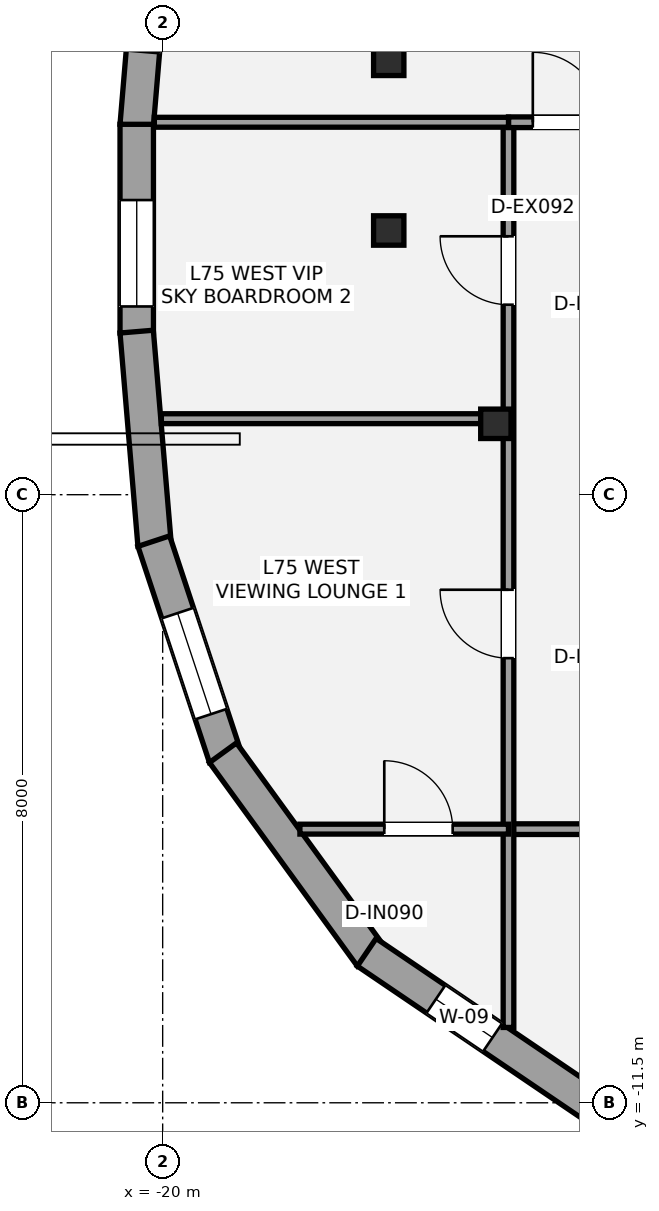
"""IFC4 building model, lengths in metres.
Left out: names, types, materials, properties, quantities, classifications, styles, units other than length and angle.
Written with IfcOpenShell. Run it as: python <this file> out.ifc"""

import sys

from ifc_helpers import new_model, si_unit, direction, frame, frame_2d, origin, origin_2d, place, context, subcontext, project, spatial, rectangle, i_section, extrude, element, fill, save


model = new_model("IFC4")
c1 = context("Model", 3, precision=1e-05, world=origin(), true_north=direction((0.0, 1.0)))
c2 = subcontext(c1, "Body", "Model", "MODEL_VIEW")
j1 = project(units=[si_unit("LENGTHUNIT", "METRE"), si_unit("PLANEANGLEUNIT", "RADIAN")], contexts=[c1])
p1 = place(None, origin())
s1 = spatial("IfcSite", under=j1, at=p1, CompositionType="ELEMENT")
p2 = place(p1, origin())
s2 = spatial("IfcBuilding", under=s1, at=p2, CompositionType="ELEMENT")
p3 = place(p2, frame((0.0, 0.0, 264.8)))
s3 = spatial("IfcBuildingStorey", under=s2, at=p3, CompositionType="ELEMENT", Elevation=264.8)
for number, where, z_axis, x_axis in (
    (1, (-17.026, 2.208, 0.0), (0.0, 0.0, 1.0), (1.0, 0.0, 0.0)),
    (2, (-17.026, -0.024, 0.0), (0.0, 0.0, 1.0), (1.0, 0.0, 0.0)),
    (3, (-15.616, -2.567, 0.0), (0.0, 0.0, 1.0), (1.0, 0.0, 0.0)),
):
    element("IfcColumn", number, at=place(p3, frame(where, z_axis=z_axis, x_axis=x_axis)), inside=s3, PredefinedType="COLUMN", context=c2, shape_type="SweptSolid", body=[
        extrude(i_section(OverallWidth=0.399, OverallDepth=0.387, WebThickness=0.021, FlangeThickness=0.033, at=origin_2d()), origin(), (0.0, 0.0, 1.0), 4.4),
    ])
p4 = place(p3, frame((-20.342, 1.354, 0.0), z_axis=(0.0, 0.0, 1.0), x_axis=(0.083719665048, 0.996489346498, 0.0)))
e4 = element("IfcWall", 4, at=p4, inside=s3, PredefinedType="STANDARD", context=c2, shape_type="SweptSolid", body=[
    extrude(rectangle(XDim=2.817, YDim=0.44, at=frame_2d((1.409, 0.0))), origin(), (0.0, 0.0, 1.0), 3.566),
])
p5 = place(p4, frame((0.975, 0.0, 0.58)))
e5 = element("IfcOpeningElement", 5, at=p5, cuts=e4, PredefinedType="OPENING", context=c2, shape_type="SweptSolid", body=[
    extrude(rectangle(XDim=1.4, YDim=1.55, at=frame_2d((0.7, 0.775))), frame((0.0, 0.23, 0.0), z_axis=(0.0, -1.0, 0.0), x_axis=(1.0, 0.0, 0.0)), (0.0, 0.0, 1.0), 0.46),
])
p6 = place(p3, frame((-20.341, -1.373, 0.0), z_axis=(0.0, 0.0, 1.0), x_axis=(0.0, 1.0, 0.0)))
e6 = element("IfcWall", 6, at=p6, inside=s3, PredefinedType="STANDARD", context=c2, shape_type="SweptSolid", body=[
    extrude(rectangle(XDim=2.746, YDim=0.44, at=frame_2d((1.373, 0.0))), origin(), (0.0, 0.0, 1.0), 3.566),
])
p7 = place(p6, frame((0.349, 0.0, 0.6)))
e7 = element("IfcOpeningElement", 7, at=p7, cuts=e6, PredefinedType="OPENING", context=c2, shape_type="SweptSolid", body=[
    extrude(rectangle(XDim=1.4, YDim=1.55, at=frame_2d((0.7, 0.775))), frame((0.0, 0.23, 0.0), z_axis=(0.0, -1.0, 0.0), x_axis=(1.0, 0.0, 0.0)), (0.0, 0.0, 1.0), 0.46),
])
p8 = place(p3, frame((-20.106, -4.162, 0.0), z_axis=(0.0, 0.0, 1.0), x_axis=(-0.083719665048, 0.996489346498, 0.0)))
e8 = element("IfcWall", 8, at=p8, inside=s3, PredefinedType="STANDARD", context=c2, shape_type="SweptSolid", body=[
    extrude(rectangle(XDim=2.817, YDim=0.44, at=frame_2d((1.409, 0.0))), origin(), (0.0, 0.0, 1.0), 3.566),
])
p9 = place(p3, frame((-19.176, -6.955, 0.0), z_axis=(0.0, 0.0, 1.0), x_axis=(-0.314148979119, 0.949373698245, 0.0)))
e9 = element("IfcWall", 9, at=p9, inside=s3, PredefinedType="STANDARD", context=c2, shape_type="SweptSolid", body=[
    extrude(rectangle(XDim=2.996, YDim=0.44, at=frame_2d((1.498, 0.0))), origin(), (0.0, 0.0, 1.0), 3.566),
])
p10 = place(p9, frame((0.599, 0.0, 0.58)))
e10 = element("IfcOpeningElement", 10, at=p10, cuts=e9, PredefinedType="OPENING", context=c2, shape_type="SweptSolid", body=[
    extrude(rectangle(XDim=1.4, YDim=1.55, at=frame_2d((0.7, 0.775))), frame((0.0, 0.23, 0.0), z_axis=(0.0, -1.0, 0.0), x_axis=(1.0, 0.0, 0.0)), (0.0, 0.0, 1.0), 0.46),
])
p11 = place(p3, frame((-17.26, -9.573, 0.0), z_axis=(0.0, 0.0, 1.0), x_axis=(-0.5878953838, 0.808936967697, 0.0)))
e11 = element("IfcWall", 11, at=p11, inside=s3, PredefinedType="STANDARD", context=c2, shape_type="SweptSolid", body=[
    extrude(rectangle(XDim=3.31, YDim=0.44, at=frame_2d((1.655, 0.0))), origin(), (0.0, 0.0, 1.0), 3.566),
])
p12 = place(p3, frame((-14.13, -11.679, 0.0), z_axis=(0.0, 0.0, 1.0), x_axis=(-0.827730474906, 0.561125886867, 0.0)))
e12 = element("IfcWall", 12, at=p12, inside=s3, PredefinedType="STANDARD", context=c2, shape_type="SweptSolid", body=[
    extrude(rectangle(XDim=3.848, YDim=0.44, at=frame_2d((1.924, 0.0))), origin(), (0.0, 0.0, 1.0), 3.566),
])
p13 = place(p12, frame((1.849, 0.0, 0.58)))
e13 = element("IfcOpeningElement", 13, at=p13, cuts=e12, PredefinedType="OPENING", context=c2, shape_type="SweptSolid", body=[
    extrude(rectangle(XDim=0.9, YDim=1.35, at=frame_2d((0.45, 0.675))), frame((0.0, 0.23, 0.0), z_axis=(0.0, -1.0, 0.0), x_axis=(1.0, 0.0, 0.0)), (0.0, 0.0, 1.0), 0.46),
])
p14 = place(p3, frame((-15.45, -7.9, 0.0), z_axis=(0.0, 0.0, 1.0), x_axis=(1.0, 0.0, 0.0)))
e14 = element("IfcWall", 14, at=p14, inside=s3, PredefinedType="PARTITIONING", context=c2, shape_type="SweptSolid", body=[
    extrude(rectangle(XDim=30.9, YDim=0.14, at=frame_2d((15.45, 0.0))), origin(), (0.0, 0.0, 1.0), 3.661),
])
p15 = place(p14, frame((5.275, 0.0, 0.0)))
e15 = element("IfcOpeningElement", 15, at=p15, cuts=e14, PredefinedType="OPENING", context=c2, shape_type="SweptSolid", body=[
    extrude(rectangle(XDim=0.9, YDim=2.1, at=frame_2d((0.45, 1.05))), frame((0.0, 0.08, 0.0), z_axis=(0.0, -1.0, 0.0), x_axis=(1.0, 0.0, 0.0)), (0.0, 0.0, 1.0), 0.16),
])
p16 = place(p14, frame((15.6, 0.0, 0.0)))
e16 = element("IfcOpeningElement", 16, at=p16, cuts=e14, PredefinedType="OPENING", context=c2, shape_type="SweptSolid", body=[
    extrude(rectangle(XDim=0.9, YDim=2.1, at=frame_2d((0.45, 1.05))), frame((0.0, 0.08, 0.0), z_axis=(0.0, -1.0, 0.0), x_axis=(1.0, 0.0, 0.0)), (0.0, 0.0, 1.0), 0.16),
])
p17 = place(p14, frame((25.025, 0.0, 0.0)))
e17 = element("IfcOpeningElement", 17, at=p17, cuts=e14, PredefinedType="OPENING", context=c2, shape_type="SweptSolid", body=[
    extrude(rectangle(XDim=1.5, YDim=2.15, at=frame_2d((0.75, 1.075))), frame((0.0, 0.08, 0.0), z_axis=(0.0, -1.0, 0.0), x_axis=(1.0, 0.0, 0.0)), (0.0, 0.0, 1.0), 0.16),
])
p18 = place(p3, frame((-15.45, -10.509, 0.0), z_axis=(0.0, 0.0, 1.0), x_axis=(0.0, 1.0, 0.0)))
e18 = element("IfcWall", 18, at=p18, inside=s3, PredefinedType="PARTITIONING", context=c2, shape_type="SweptSolid", body=[
    extrude(rectangle(XDim=11.909, YDim=0.14, at=frame_2d((5.955, 0.0))), origin(), (0.0, 0.0, 1.0), 3.661),
])
p19 = place(p18, frame((4.859, 0.0, 0.0)))
e19 = element("IfcOpeningElement", 19, at=p19, cuts=e18, PredefinedType="OPENING", context=c2, shape_type="SweptSolid", body=[
    extrude(rectangle(XDim=0.9, YDim=2.1, at=frame_2d((0.45, 1.05))), frame((0.0, 0.08, 0.0), z_axis=(0.0, -1.0, 0.0), x_axis=(1.0, 0.0, 0.0)), (0.0, 0.0, 1.0), 0.16),
])
p20 = place(p18, frame((9.509, 0.0, 0.0)))
e20 = element("IfcOpeningElement", 20, at=p20, cuts=e18, PredefinedType="OPENING", context=c2, shape_type="SweptSolid", body=[
    extrude(rectangle(XDim=0.9, YDim=2.1, at=frame_2d((0.45, 1.05))), frame((0.0, 0.08, 0.0), z_axis=(0.0, -1.0, 0.0), x_axis=(1.0, 0.0, 0.0)), (0.0, 0.0, 1.0), 0.16),
])
p21 = place(p3, frame((-15.45, 1.4, 0.0), z_axis=(0.0, 0.0, 1.0), x_axis=(1.0, 0.0, 0.0)))
e21 = element("IfcWall", 21, at=p21, inside=s3, PredefinedType="PARTITIONING", context=c2, shape_type="SweptSolid", body=[
    extrude(rectangle(XDim=1.75, YDim=0.14, at=frame_2d((0.875, 0.0))), origin(), (0.0, 0.0, 1.0), 3.661),
])
p22 = place(p21, frame((0.32, 0.0, 0.0)))
e22 = element("IfcOpeningElement", 22, at=p22, cuts=e21, PredefinedType="OPENING", context=c2, shape_type="SweptSolid", body=[
    extrude(rectangle(XDim=0.92, YDim=2.15, at=frame_2d((0.46, 1.075))), frame((0.0, 0.08, 0.0), z_axis=(0.0, -1.0, 0.0), x_axis=(1.0, 0.0, 0.0)), (0.0, 0.0, 1.0), 0.16),
])
p23 = place(p3, frame((-20.109, 1.4, 0.0), z_axis=(0.0, 0.0, 1.0), x_axis=(1.0, 0.0, 0.0)))
e23 = element("IfcWall", 23, at=p23, inside=s3, PredefinedType="PARTITIONING", context=c2, shape_type="SweptSolid", body=[
    extrude(rectangle(XDim=4.659, YDim=0.13, at=frame_2d((2.33, 0.0))), origin(), (0.0, 0.0, 1.0), 3.661),
])
p24 = place(p3, frame((-18.194, -7.9, 0.0), z_axis=(0.0, 0.0, 1.0), x_axis=(1.0, 0.0, 0.0)))
e24 = element("IfcWall", 24, at=p24, inside=s3, PredefinedType="PARTITIONING", context=c2, shape_type="SweptSolid", body=[
    extrude(rectangle(XDim=2.744, YDim=0.13, at=frame_2d((1.372, 0.0))), origin(), (0.0, 0.0, 1.0), 4.2),
])
p25 = place(p24, frame((1.11, 0.0, 0.0)))
e25 = element("IfcOpeningElement", 25, at=p25, cuts=e24, PredefinedType="OPENING", context=c2, shape_type="SweptSolid", body=[
    extrude(rectangle(XDim=0.9, YDim=2.1, at=frame_2d((0.45, 1.05))), frame((0.0, 0.075, 0.0), z_axis=(0.0, -1.0, 0.0), x_axis=(1.0, 0.0, 0.0)), (0.0, 0.0, 1.0), 0.15),
])
p26 = place(p3, frame((-20.017, -2.5, 0.0), z_axis=(0.0, 0.0, 1.0), x_axis=(1.0, 0.0, 0.0)))
e26 = element("IfcWall", 26, at=p26, inside=s3, PredefinedType="PARTITIONING", context=c2, shape_type="SweptSolid", body=[
    extrude(rectangle(XDim=4.567, YDim=0.13, at=frame_2d((2.284, 0.0))), origin(), (0.0, 0.0, 1.0), 3.587),
])
p27 = place(p5, origin())
e27 = element("IfcWindow", 27, at=p27, inside=s3, PartitioningType="SINGLE_PANEL", PredefinedType="WINDOW", context=c2, shape_type="SweptSolid", body=[
    extrude(rectangle(XDim=1.4, YDim=1.55, at=frame_2d((0.7, 0.775))), frame((0.0, -0.01, 0.0), z_axis=(0.0, -1.0, 0.0), x_axis=(1.0, 0.0, 0.0)), (0.0, 0.0, 1.0), 0.06),
])
fill(e5, e27)
p28 = place(p7, origin())
e28 = element("IfcWindow", 28, at=p28, inside=s3, PartitioningType="SINGLE_PANEL", PredefinedType="WINDOW", context=c2, shape_type="SweptSolid", body=[
    extrude(rectangle(XDim=1.4, YDim=1.55, at=frame_2d((0.7, 0.775))), frame((0.0, -0.01, 0.0), z_axis=(0.0, -1.0, 0.0), x_axis=(1.0, 0.0, 0.0)), (0.0, 0.0, 1.0), 0.06),
])
fill(e7, e28)
p29 = place(p10, origin())
e29 = element("IfcWindow", 29, at=p29, inside=s3, PartitioningType="SINGLE_PANEL", PredefinedType="WINDOW", context=c2, shape_type="SweptSolid", body=[
    extrude(rectangle(XDim=1.4, YDim=1.55, at=frame_2d((0.7, 0.775))), frame((0.0, -0.01, 0.0), z_axis=(0.0, -1.0, 0.0), x_axis=(1.0, 0.0, 0.0)), (0.0, 0.0, 1.0), 0.06),
])
fill(e10, e29)
p30 = place(p13, origin())
e30 = element("IfcWindow", 30, at=p30, inside=s3, PartitioningType="SINGLE_PANEL", PredefinedType="WINDOW", context=c2, shape_type="SweptSolid", body=[
    extrude(rectangle(XDim=0.9, YDim=1.35, at=frame_2d((0.45, 0.675))), frame((0.0, -0.01, 0.0), z_axis=(0.0, -1.0, 0.0), x_axis=(1.0, 0.0, 0.0)), (0.0, 0.0, 1.0), 0.06),
])
fill(e13, e30)
p31 = place(p22, origin())
e31 = element("IfcDoor", 31, at=p31, inside=s3, OperationType="SINGLE_SWING_LEFT", PredefinedType="DOOR", context=c2, shape_type="SweptSolid", body=[
    extrude(rectangle(XDim=0.92, YDim=2.15, at=frame_2d((0.46, 1.075))), frame((0.0, 0.025, 0.0), z_axis=(0.0, -1.0, 0.0), x_axis=(1.0, 0.0, 0.0)), (0.0, 0.0, 1.0), 0.05),
])
fill(e22, e31)
p32 = place(p25, origin())
e32 = element("IfcDoor", 32, at=p32, inside=s3, OperationType="SINGLE_SWING_LEFT", PredefinedType="DOOR", context=c2, shape_type="SweptSolid", body=[
    extrude(rectangle(XDim=0.9, YDim=2.1, at=frame_2d((0.45, 1.05))), frame((0.0, 0.025, 0.0), z_axis=(0.0, -1.0, 0.0), x_axis=(1.0, 0.0, 0.0)), (0.0, 0.0, 1.0), 0.05),
])
fill(e25, e32)
p33 = place(p19, origin())
e33 = element("IfcDoor", 33, at=p33, inside=s3, OperationType="SINGLE_SWING_RIGHT", PredefinedType="DOOR", context=c2, shape_type="SweptSolid", body=[
    extrude(rectangle(XDim=0.9, YDim=2.1, at=frame_2d((0.45, 1.05))), frame((0.0, 0.025, 0.0), z_axis=(0.0, -1.0, 0.0), x_axis=(1.0, 0.0, 0.0)), (0.0, 0.0, 1.0), 0.05),
])
fill(e19, e33)
p34 = place(p20, origin())
e34 = element("IfcDoor", 34, at=p34, inside=s3, OperationType="SINGLE_SWING_RIGHT", PredefinedType="DOOR", context=c2, shape_type="SweptSolid", body=[
    extrude(rectangle(XDim=0.9, YDim=2.1, at=frame_2d((0.45, 1.05))), frame((0.0, 0.025, 0.0), z_axis=(0.0, -1.0, 0.0), x_axis=(1.0, 0.0, 0.0)), (0.0, 0.0, 1.0), 0.05),
])
fill(e20, e34)
save(model, sys.argv[1])
